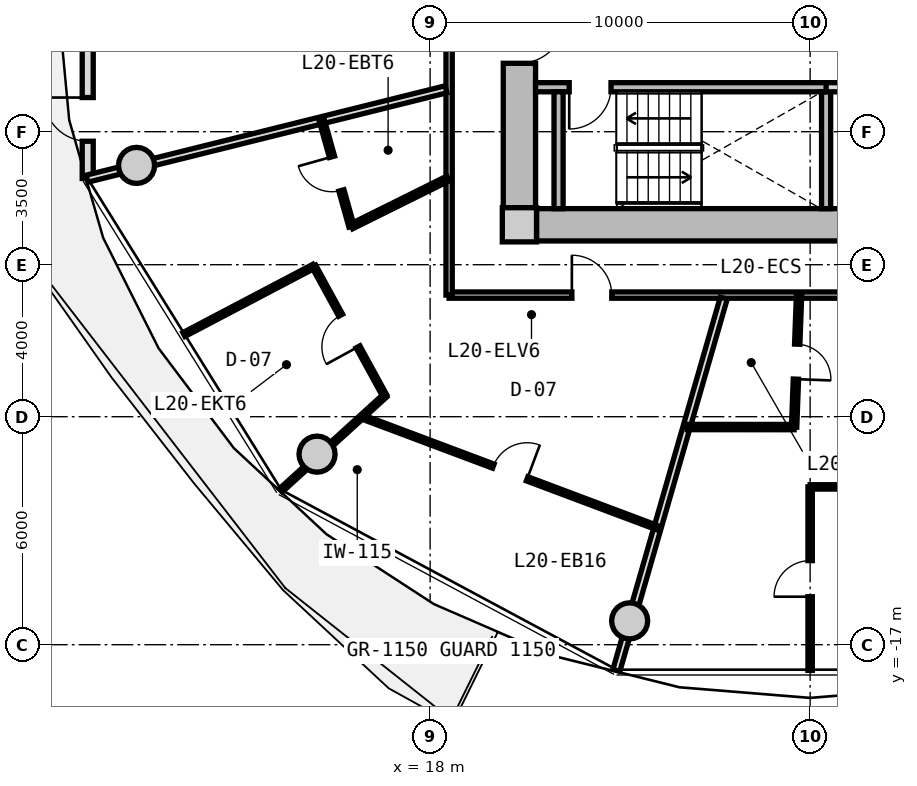
"""IFC4 building model, lengths in metres.
Left out: names, types, materials, properties, quantities, classifications, styles, units other than length and angle.
Written with IfcOpenShell. Run it as: python <this file> out.ifc"""

import sys

from ifc_helpers import new_model, si_unit, direction, frame, frame_2d, origin, origin_2d, place, context, subcontext, project, spatial, rectangle, circle, extrude, source, transform, mapped, element, fill, save


model = new_model("IFC4")
c1 = context("Model", 3, precision=1e-05, world=origin(), true_north=direction((0.0, 1.0)))
c2 = subcontext(c1, "Body", "Model", "MODEL_VIEW")
j1 = project(units=[si_unit("LENGTHUNIT", "METRE"), si_unit("PLANEANGLEUNIT", "RADIAN")], contexts=[c1])
p1 = place(None, origin())
s1 = spatial("IfcSite", under=j1, at=p1, CompositionType="ELEMENT")
p2 = place(p1, origin())
s2 = spatial("IfcBuilding", under=s1, at=p2, CompositionType="ELEMENT")
p3 = place(p2, frame((0.0, 0.0, 67.35)))
s3 = spatial("IfcBuildingStorey", under=s2, at=p3, CompositionType="ELEMENT", Elevation=67.35)
m1 = source(origin(), c2, "Body", "SweptSolid", [
    extrude(rectangle(XDim=0.9, YDim=0.9, at=origin_2d()), origin(), (0.0, 0.0, 1.0), 3.05),
])
p4 = place(p3, frame((20.35, -5.95, 0.0), z_axis=(0.0, 0.0, 1.0), x_axis=(1.0, 0.0, 0.0)))
e1 = element("IfcColumn", 1, at=p4, inside=s3, PredefinedType="COLUMN", context=c2, shape_type="MappedRepresentation", body=[
    mapped(m1, transform((0.0, 0.0, 0.0), x_axis=(1.0, 0.0, 0.0), y_axis=(0.0, 1.0, 0.0), z_axis=(0.0, 0.0, 1.0), scale=1.0)),
])
m2 = source(origin(), c2, "Body", "SweptSolid", [
    extrude(rectangle(XDim=14.4, YDim=0.85, at=frame_2d((7.2, 0.0))), origin(), (0.0, 0.0, 1.0), 2.79),
])
p5 = place(p3, frame((35.2, -5.95, 0.0), z_axis=(0.0, 0.0, 1.0), x_axis=(-1.0, 0.0, 0.0)))
e2 = element("IfcWall", 2, at=p5, inside=s3, PredefinedType="SHEAR", context=c2, shape_type="MappedRepresentation", body=[
    mapped(m2, transform((0.0, 0.0, 0.0), x_axis=(1.0, 0.0, 0.0), y_axis=(0.0, 1.0, 0.0), z_axis=(0.0, 0.0, 1.0), scale=1.0)),
])
m3 = source(origin(), c2, "Body", "SweptSolid", [
    extrude(rectangle(XDim=11.0, YDim=0.85, at=frame_2d((5.5, 0.0))), origin(), (0.0, 0.0, 1.0), 2.79),
])
p6 = place(p3, frame((20.35, -5.5, 0.0), z_axis=(0.0, 0.0, 1.0), x_axis=(0.0, 1.0, 0.0)))
e3 = element("IfcWall", 3, at=p6, inside=s3, PredefinedType="SHEAR", context=c2, shape_type="MappedRepresentation", body=[
    mapped(m3, transform((0.0, 0.0, 0.0), x_axis=(1.0, 0.0, 0.0), y_axis=(0.0, 1.0, 0.0), z_axis=(0.0, 0.0, 1.0), scale=1.0)),
])
p7 = place(p6, frame((3.8, 0.0, 0.0)))
e4 = element("IfcOpeningElement", 4, at=p7, cuts=e3, PredefinedType="OPENING", context=c2, shape_type="SweptSolid", body=[
    extrude(rectangle(XDim=1.2, YDim=2.15, at=frame_2d((0.6, 1.075))), frame((0.0, 0.435, 0.0), z_axis=(0.0, -1.0, 0.0), x_axis=(1.0, 0.0, 0.0)), (0.0, 0.0, 1.0), 0.87),
])
m4 = source(origin(), c2, "Body", "SweptSolid", [
    extrude(circle(Radius=0.475, at=origin_2d()), origin(), (0.0, 0.0, 1.0), 3.05),
])
for number, where, z_axis, x_axis in (
    (5, (10.275, -4.387, 0.0), (0.0, 0.0, 1.0), (1.0, 0.0, 0.0)),
    (6, (15.025, -11.985, 0.0), (0.0, 0.0, 1.0), (1.0, 0.0, 0.0)),
    (7, (23.251, -16.373, 0.0), (0.0, 0.0, 1.0), (1.0, 0.0, 0.0)),
):
    element("IfcColumn", number, at=place(p3, frame(where, z_axis=z_axis, x_axis=x_axis)), inside=s3, PredefinedType="COLUMN", context=c2, shape_type="MappedRepresentation", body=[
        mapped(m4, transform((0.0, 0.0, 0.0), x_axis=(1.0, 0.0, 0.0), y_axis=(0.0, 1.0, 0.0), z_axis=(0.0, 0.0, 1.0), scale=1.0)),
    ])
m5 = source(origin(), c2, "Body", "SweptSolid", [
    extrude(rectangle(XDim=9.462, YDim=0.29, at=frame_2d((4.731, 0.0))), origin(), (0.0, 0.0, 1.0), 2.79),
])
p8 = place(p3, frame((8.99, -4.731, 0.0), z_axis=(0.0, 0.0, 1.0), x_axis=(0.0, 1.0, 0.0)))
e8 = element("IfcWall", 8, at=p8, inside=s3, PredefinedType="SOLIDWALL", context=c2, shape_type="MappedRepresentation", body=[
    mapped(m5, transform((0.0, 0.0, 0.0), x_axis=(1.0, 0.0, 0.0), y_axis=(0.0, 1.0, 0.0), z_axis=(0.0, 0.0, 1.0), scale=1.0)),
])
p9 = place(p8, frame((0.98, 0.0, 0.0)))
e9 = element("IfcOpeningElement", 9, at=p9, cuts=e8, PredefinedType="OPENING", context=c2, shape_type="SweptSolid", body=[
    extrude(rectangle(XDim=1.15, YDim=2.25, at=frame_2d((0.575, 1.125))), frame((0.0, 0.155, 0.0), z_axis=(0.0, -1.0, 0.0), x_axis=(1.0, 0.0, 0.0)), (0.0, 0.0, 1.0), 0.31),
])
p10 = place(p8, frame((5.081, 0.0, 0.85)))
e10 = element("IfcOpeningElement", 10, at=p10, cuts=e8, PredefinedType="OPENING", context=c2, shape_type="SweptSolid", body=[
    extrude(rectangle(XDim=1.2, YDim=1.5, at=frame_2d((0.6, 0.75))), frame((0.0, 0.155, 0.0), z_axis=(0.0, -1.0, 0.0), x_axis=(1.0, 0.0, 0.0)), (0.0, 0.0, 1.0), 0.31),
])
m6 = source(origin(), c2, "Body", "SweptSolid", [
    extrude(rectangle(XDim=7.765, YDim=0.24, at=frame_2d((3.883, 0.0))), origin(), (0.0, 0.0, 1.0), 2.79),
])
p11 = place(p3, frame((20.775, -2.33, 0.0), z_axis=(0.0, 0.0, 1.0), x_axis=(1.0, 0.0, 0.0)))
e11 = element("IfcWall", 11, at=p11, inside=s3, PredefinedType="PARTITIONING", context=c2, shape_type="MappedRepresentation", body=[
    mapped(m6, transform((0.0, 0.0, 0.0), x_axis=(1.0, 0.0, 0.0), y_axis=(0.0, 1.0, 0.0), z_axis=(0.0, 0.0, 1.0), scale=1.0)),
])
p12 = place(p11, frame((0.885, 0.0, 0.0)))
e12 = element("IfcOpeningElement", 12, at=p12, cuts=e11, PredefinedType="OPENING", context=c2, shape_type="SweptSolid", body=[
    extrude(rectangle(XDim=1.1, YDim=2.15, at=frame_2d((0.55, 1.075))), frame((0.0, 0.13, 0.0), z_axis=(0.0, -1.0, 0.0), x_axis=(1.0, 0.0, 0.0)), (0.0, 0.0, 1.0), 0.26),
])
m7 = source(origin(), c2, "Body", "SweptSolid", [
    extrude(rectangle(XDim=3.075, YDim=0.24, at=frame_2d((1.538, 0.0))), origin(), (0.0, 0.0, 1.0), 2.79),
])
for number, where, z_axis, x_axis in (
    (13, (21.38, -5.525, 0.0), (0.0, 0.0, 1.0), (0.0, 1.0, 0.0)),
    (14, (28.42, -5.525, 0.0), (0.0, 0.0, 1.0), (0.0, 1.0, 0.0)),
):
    element("IfcWall", number, at=place(p3, frame(where, z_axis=z_axis, x_axis=x_axis)), inside=s3, PredefinedType="PARTITIONING", context=c2, shape_type="MappedRepresentation", body=[
        mapped(m7, transform((0.0, 0.0, 0.0), x_axis=(1.0, 0.0, 0.0), y_axis=(0.0, 1.0, 0.0), z_axis=(0.0, 0.0, 1.0), scale=1.0)),
    ])
m8 = source(origin(), c2, "Body", "SweptSolid", [
    extrude(rectangle(XDim=4.13, YDim=0.24, at=frame_2d((2.065, 0.0))), origin(), (0.0, 0.0, 1.0), 2.775),
])
p13 = place(p3, frame((28.42, -2.33, 0.0), z_axis=(0.0, 0.0, 1.0), x_axis=(1.0, 0.0, 0.0)))
e15 = element("IfcWall", 15, at=p13, inside=s3, PredefinedType="PARTITIONING", context=c2, shape_type="MappedRepresentation", body=[
    mapped(m8, transform((0.0, 0.0, 0.0), x_axis=(1.0, 0.0, 0.0), y_axis=(0.0, 1.0, 0.0), z_axis=(0.0, 0.0, 1.0), scale=1.0)),
])
m9 = source(origin(), c2, "Body", "SweptSolid", [
    extrude(rectangle(XDim=19.0, YDim=0.165, at=frame_2d((9.5, 0.0))), origin(), (0.0, 0.0, 1.0), 2.775),
])
p14 = place(p3, frame((37.5, -7.8, 0.0), z_axis=(0.0, 0.0, 1.0), x_axis=(-1.0, 0.0, 0.0)))
e16 = element("IfcWall", 16, at=p14, inside=s3, PredefinedType="PARTITIONING", context=c2, shape_type="MappedRepresentation", body=[
    mapped(m9, transform((0.0, 0.0, 0.0), x_axis=(1.0, 0.0, 0.0), y_axis=(0.0, 1.0, 0.0), z_axis=(0.0, 0.0, 1.0), scale=1.0)),
])
p15 = place(p14, frame((14.72, 0.0, 0.0)))
e17 = element("IfcOpeningElement", 17, at=p15, cuts=e16, PredefinedType="OPENING", context=c2, shape_type="SweptSolid", body=[
    extrude(rectangle(XDim=1.05, YDim=2.15, at=frame_2d((0.525, 1.075))), frame((0.0, 0.093, 0.0), z_axis=(0.0, -1.0, 0.0), x_axis=(1.0, 0.0, 0.0)), (0.0, 0.0, 1.0), 0.185),
])
p16 = place(p14, frame((4.847, 0.0, 0.0)))
e18 = element("IfcOpeningElement", 18, at=p16, cuts=e16, PredefinedType="OPENING", context=c2, shape_type="SweptSolid", body=[
    extrude(rectangle(XDim=1.05, YDim=2.15, at=frame_2d((0.525, 1.075))), frame((0.0, 0.093, 0.0), z_axis=(0.0, -1.0, 0.0), x_axis=(1.0, 0.0, 0.0)), (0.0, 0.0, 1.0), 0.185),
])
m10 = source(origin(), c2, "Body", "SweptSolid", [
    extrude(rectangle(XDim=15.6, YDim=0.165, at=frame_2d((7.8, 0.0))), origin(), (0.0, 0.0, 1.0), 2.775),
])
p17 = place(p3, frame((18.5, -7.8, 0.0), z_axis=(0.0, 0.0, 1.0), x_axis=(0.0, 1.0, 0.0)))
e19 = element("IfcWall", 19, at=p17, inside=s3, PredefinedType="PARTITIONING", context=c2, shape_type="MappedRepresentation", body=[
    mapped(m10, transform((0.0, 0.0, 0.0), x_axis=(1.0, 0.0, 0.0), y_axis=(0.0, 1.0, 0.0), z_axis=(0.0, 0.0, 1.0), scale=1.0)),
])
p18 = place(p17, frame((14.215, 0.0, 0.0)))
e20 = element("IfcOpeningElement", 20, at=p18, cuts=e19, PredefinedType="OPENING", context=c2, shape_type="SweptSolid", body=[
    extrude(rectangle(XDim=0.92, YDim=2.1, at=frame_2d((0.46, 1.05))), frame((0.0, 0.093, 0.0), z_axis=(0.0, -1.0, 0.0), x_axis=(1.0, 0.0, 0.0)), (0.0, 0.0, 1.0), 0.185),
])
p19 = place(p17, frame((11.609, 0.0, 0.0)))
e21 = element("IfcOpeningElement", 21, at=p19, cuts=e19, PredefinedType="OPENING", context=c2, shape_type="SweptSolid", body=[
    extrude(rectangle(XDim=0.92, YDim=2.1, at=frame_2d((0.46, 1.05))), frame((0.0, 0.093, 0.0), z_axis=(0.0, -1.0, 0.0), x_axis=(1.0, 0.0, 0.0)), (0.0, 0.0, 1.0), 0.185),
])
p20 = place(p17, frame((7.175, 0.0, 0.0)))
e22 = element("IfcOpeningElement", 22, at=p20, cuts=e19, PredefinedType="OPENING", context=c2, shape_type="SweptSolid", body=[
    extrude(rectangle(XDim=1.25, YDim=2.2, at=frame_2d((0.625, 1.1))), frame((0.0, 0.093, 0.0), z_axis=(0.0, -1.0, 0.0), x_axis=(1.0, 0.0, 0.0)), (0.0, 0.0, 1.0), 0.185),
])
m11 = source(origin(), c2, "Body", "SweptSolid", [
    extrude(rectangle(XDim=9.737, YDim=0.19, at=frame_2d((4.869, 0.0))), origin(), (0.0, 0.0, 1.0), 2.225),
])
p21 = place(p3, frame((18.42, -2.385, 0.0), z_axis=(0.0, 0.0, 1.0), x_axis=(-0.970392716238, -0.241532557375, 0.0)))
e23 = element("IfcWall", 23, at=p21, inside=s3, PredefinedType="PARTITIONING", context=c2, shape_type="MappedRepresentation", body=[
    mapped(m11, transform((0.0, 0.0, 0.0), x_axis=(1.0, 0.0, 0.0), y_axis=(0.0, 1.0, 0.0), z_axis=(0.0, 0.0, 1.0), scale=1.0)),
])
m12 = source(origin(), c2, "Body", "SweptSolid", [
    extrude(rectangle(XDim=10.196, YDim=0.19, at=frame_2d((5.098, 0.0))), origin(), (0.0, 0.0, 1.0), 2.225),
])
p22 = place(p3, frame((25.727, -7.88, 0.0), z_axis=(0.0, 0.0, 1.0), x_axis=(-0.277136420347, -0.960830580549, 0.0)))
e24 = element("IfcWall", 24, at=p22, inside=s3, PredefinedType="PARTITIONING", context=c2, shape_type="MappedRepresentation", body=[
    mapped(m12, transform((0.0, 0.0, 0.0), x_axis=(1.0, 0.0, 0.0), y_axis=(0.0, 1.0, 0.0), z_axis=(0.0, 0.0, 1.0), scale=1.0)),
])
m13 = source(origin(), c2, "Body", "SweptSolid", [
    extrude(rectangle(XDim=8.32, YDim=0.115, at=frame_2d((4.16, 0.0))), origin(), (0.0, 0.0, 1.0), 2.775),
])
p23 = place(p3, frame((16.214, -11.006, 0.0), z_axis=(0.0, 0.0, 1.0), x_axis=(0.936180763098, -0.351518959382, 0.0)))
e25 = element("IfcWall", 25, at=p23, inside=s3, PredefinedType="PARTITIONING", context=c2, shape_type="MappedRepresentation", body=[
    mapped(m13, transform((0.0, 0.0, 0.0), x_axis=(1.0, 0.0, 0.0), y_axis=(0.0, 1.0, 0.0), z_axis=(0.0, 0.0, 1.0), scale=1.0)),
])
p24 = place(p23, frame((3.685, 0.0, 0.0)))
e26 = element("IfcOpeningElement", 26, at=p24, cuts=e25, PredefinedType="OPENING", context=c2, shape_type="SweptSolid", body=[
    extrude(rectangle(XDim=0.95, YDim=2.1, at=frame_2d((0.475, 1.05))), frame((0.0, 0.067, 0.0), z_axis=(0.0, -1.0, 0.0), x_axis=(1.0, 0.0, 0.0)), (0.0, 0.0, 1.0), 0.135),
])
m14 = source(origin(), c2, "Body", "SweptSolid", [
    extrude(rectangle(XDim=3.713, YDim=0.115, at=frame_2d((1.856, 0.0))), origin(), (0.0, 0.0, 1.0), 2.225),
])
p25 = place(p3, frame((16.817, -10.442, 0.0), z_axis=(0.0, 0.0, 1.0), x_axis=(-0.739877587881, -0.67274152165, 0.0)))
e27 = element("IfcWall", 27, at=p25, inside=s3, PredefinedType="PARTITIONING", context=c2, shape_type="MappedRepresentation", body=[
    mapped(m14, transform((0.0, 0.0, 0.0), x_axis=(1.0, 0.0, 0.0), y_axis=(0.0, 1.0, 0.0), z_axis=(0.0, 0.0, 1.0), scale=1.0)),
])
m15 = source(origin(), c2, "Body", "SweptSolid", [
    extrude(rectangle(XDim=2.834, YDim=0.14, at=frame_2d((1.417, 0.0))), origin(), (0.0, 0.0, 1.0), 2.775),
])
p26 = place(p3, frame((18.47, -4.732, 0.0), z_axis=(0.0, 0.0, 1.0), x_axis=(-0.895681174462, -0.444696788513, 0.0)))
e28 = element("IfcWall", 28, at=p26, inside=s3, PredefinedType="PARTITIONING", context=c2, shape_type="MappedRepresentation", body=[
    mapped(m15, transform((0.0, 0.0, 0.0), x_axis=(1.0, 0.0, 0.0), y_axis=(0.0, 1.0, 0.0), z_axis=(0.0, 0.0, 1.0), scale=1.0)),
])
m16 = source(origin(), c2, "Body", "SweptSolid", [
    extrude(rectangle(XDim=2.885, YDim=0.14, at=frame_2d((1.442, 0.0))), origin(), (0.0, 0.0, 1.0), 2.775),
])
p27 = place(p3, frame((15.931, -5.992, 0.0), z_axis=(0.0, 0.0, 1.0), x_axis=(-0.269799431837, 0.962916541856, 0.0)))
e29 = element("IfcWall", 29, at=p27, inside=s3, PredefinedType="PARTITIONING", context=c2, shape_type="MappedRepresentation", body=[
    mapped(m16, transform((0.0, 0.0, 0.0), x_axis=(1.0, 0.0, 0.0), y_axis=(0.0, 1.0, 0.0), z_axis=(0.0, 0.0, 1.0), scale=1.0)),
])
p28 = place(p27, frame((0.982, 0.0, 0.0)))
e30 = element("IfcOpeningElement", 30, at=p28, cuts=e29, PredefinedType="OPENING", context=c2, shape_type="SweptSolid", body=[
    extrude(rectangle(XDim=0.92, YDim=2.1, at=frame_2d((0.46, 1.05))), frame((0.0, 0.08, 0.0), z_axis=(0.0, -1.0, 0.0), x_axis=(1.0, 0.0, 0.0)), (0.0, 0.0, 1.0), 0.16),
])
m17 = source(origin(), c2, "Body", "SweptSolid", [
    extrude(rectangle(XDim=3.864, YDim=0.115, at=frame_2d((1.932, 0.0))), origin(), (0.0, 0.0, 1.0), 2.775),
])
p29 = place(p3, frame((14.94, -7.041, 0.0), z_axis=(0.0, 0.0, 1.0), x_axis=(-0.885194959803, -0.465220252289, 0.0)))
e31 = element("IfcWall", 31, at=p29, inside=s3, PredefinedType="PARTITIONING", context=c2, shape_type="MappedRepresentation", body=[
    mapped(m17, transform((0.0, 0.0, 0.0), x_axis=(1.0, 0.0, 0.0), y_axis=(0.0, 1.0, 0.0), z_axis=(0.0, 0.0, 1.0), scale=1.0)),
])
m18 = source(origin(), c2, "Body", "SweptSolid", [
    extrude(rectangle(XDim=3.888, YDim=0.115, at=frame_2d((1.944, 0.0))), origin(), (0.0, 0.0, 1.0), 2.775),
])
p30 = place(p3, frame((14.94, -7.041, 0.0), z_axis=(0.0, 0.0, 1.0), x_axis=(0.480382482853, -0.877059103007, 0.0)))
e32 = element("IfcWall", 32, at=p30, inside=s3, PredefinedType="PARTITIONING", context=c2, shape_type="MappedRepresentation", body=[
    mapped(m18, transform((0.0, 0.0, 0.0), x_axis=(1.0, 0.0, 0.0), y_axis=(0.0, 1.0, 0.0), z_axis=(0.0, 0.0, 1.0), scale=1.0)),
])
p31 = place(p30, frame((1.469, 0.0, 0.0)))
e33 = element("IfcOpeningElement", 33, at=p31, cuts=e32, PredefinedType="OPENING", context=c2, shape_type="SweptSolid", body=[
    extrude(rectangle(XDim=0.95, YDim=2.1, at=frame_2d((0.475, 1.05))), frame((0.0, 0.067, 0.0), z_axis=(0.0, -1.0, 0.0), x_axis=(1.0, 0.0, 0.0)), (0.0, 0.0, 1.0), 0.135),
])
m19 = source(origin(), c2, "Body", "SweptSolid", [
    extrude(rectangle(XDim=3.446, YDim=0.14, at=frame_2d((1.723, 0.0))), origin(), (0.0, 0.0, 1.0), 2.775),
])
p32 = place(p3, frame((27.707, -7.83, 0.0), z_axis=(0.0, 0.0, 1.0), x_axis=(-0.037409983043, -0.999300001585, 0.0)))
e34 = element("IfcWall", 34, at=p32, inside=s3, PredefinedType="PARTITIONING", context=c2, shape_type="MappedRepresentation", body=[
    mapped(m19, transform((0.0, 0.0, 0.0), x_axis=(1.0, 0.0, 0.0), y_axis=(0.0, 1.0, 0.0), z_axis=(0.0, 0.0, 1.0), scale=1.0)),
])
p33 = place(p32, frame((1.263, 0.0, 0.0)))
e35 = element("IfcOpeningElement", 35, at=p33, cuts=e34, PredefinedType="OPENING", context=c2, shape_type="SweptSolid", body=[
    extrude(rectangle(XDim=0.92, YDim=2.1, at=frame_2d((0.46, 1.05))), frame((0.0, 0.08, 0.0), z_axis=(0.0, -1.0, 0.0), x_axis=(1.0, 0.0, 0.0)), (0.0, 0.0, 1.0), 0.16),
])
m20 = source(origin(), c2, "Body", "SweptSolid", [
    extrude(rectangle(XDim=2.813, YDim=0.14, at=frame_2d((1.406, 0.0))), origin(), (0.0, 0.0, 1.0), 2.775),
])
p34 = place(p3, frame((27.578, -11.273, 0.0), z_axis=(0.0, 0.0, 1.0), x_axis=(-0.99999981542, 0.000607586035, 0.0)))
e36 = element("IfcWall", 36, at=p34, inside=s3, PredefinedType="PARTITIONING", context=c2, shape_type="MappedRepresentation", body=[
    mapped(m20, transform((0.0, 0.0, 0.0), x_axis=(1.0, 0.0, 0.0), y_axis=(0.0, 1.0, 0.0), z_axis=(0.0, 0.0, 1.0), scale=1.0)),
])
m21 = source(origin(), c2, "Body", "SweptSolid", [
    extrude(rectangle(XDim=4.829, YDim=0.115, at=frame_2d((2.415, 0.0))), origin(), (0.0, 0.0, 1.0), 2.775),
])
p35 = place(p3, frame((28.0, -12.848, 0.0), z_axis=(0.0, 0.0, 1.0), x_axis=(0.0, -1.0, 0.0)))
e37 = element("IfcWall", 37, at=p35, inside=s3, PredefinedType="PARTITIONING", context=c2, shape_type="MappedRepresentation", body=[
    mapped(m21, transform((0.0, 0.0, 0.0), x_axis=(1.0, 0.0, 0.0), y_axis=(0.0, 1.0, 0.0), z_axis=(0.0, 0.0, 1.0), scale=1.0)),
])
p36 = place(p35, frame((1.939, 0.0, 0.0)))
e38 = element("IfcOpeningElement", 38, at=p36, cuts=e37, PredefinedType="OPENING", context=c2, shape_type="SweptSolid", body=[
    extrude(rectangle(XDim=0.95, YDim=2.1, at=frame_2d((0.475, 1.05))), frame((0.0, 0.067, 0.0), z_axis=(0.0, -1.0, 0.0), x_axis=(1.0, 0.0, 0.0)), (0.0, 0.0, 1.0), 0.135),
])
m22 = source(origin(), c2, "Body", "SweptSolid", [
    extrude(rectangle(XDim=3.686, YDim=0.115, at=frame_2d((1.843, 0.0))), origin(), (0.0, 0.0, 1.0), 2.775),
])
p37 = place(p3, frame((28.0, -12.848, 0.0), z_axis=(0.0, 0.0, 1.0), x_axis=(0.999999780653, 0.000662339237, 0.0)))
e39 = element("IfcWall", 39, at=p37, inside=s3, PredefinedType="PARTITIONING", context=c2, shape_type="MappedRepresentation", body=[
    mapped(m22, transform((0.0, 0.0, 0.0), x_axis=(1.0, 0.0, 0.0), y_axis=(0.0, 1.0, 0.0), z_axis=(0.0, 0.0, 1.0), scale=1.0)),
])
m23 = source(origin(), c2, "Body", "SweptSolid", [
    extrude(rectangle(XDim=1.15, YDim=2.25, at=frame_2d((0.575, 1.125))), frame((0.0, 0.025, 0.0), z_axis=(0.0, -1.0, 0.0), x_axis=(1.0, 0.0, 0.0)), (0.0, 0.0, 1.0), 0.05),
])
p38 = place(p9, origin())
e40 = element("IfcDoor", 40, at=p38, inside=s3, OperationType="SINGLE_SWING_RIGHT", PredefinedType="DOOR", context=c2, shape_type="MappedRepresentation", body=[
    mapped(m23, transform((0.0, 0.0, 0.0), x_axis=(1.0, 0.0, 0.0), y_axis=(0.0, 1.0, 0.0), z_axis=(0.0, 0.0, 1.0), scale=1.0)),
])
fill(e9, e40)
m24 = source(origin(), c2, "Body", "SweptSolid", [
    extrude(rectangle(XDim=1.1, YDim=2.15, at=frame_2d((0.55, 1.075))), frame((0.0, 0.025, 0.0), z_axis=(0.0, -1.0, 0.0), x_axis=(1.0, 0.0, 0.0)), (0.0, 0.0, 1.0), 0.05),
])
p39 = place(p12, frame((1.1, 0.0, 0.0), z_axis=(0.0, 0.0, 1.0), x_axis=(-1.0, 0.0, 0.0)))
e41 = element("IfcDoor", 41, at=p39, inside=s3, OperationType="SINGLE_SWING_RIGHT", PredefinedType="DOOR", context=c2, shape_type="MappedRepresentation", body=[
    mapped(m24, transform((0.0, 0.0, 0.0), x_axis=(1.0, 0.0, 0.0), y_axis=(0.0, 1.0, 0.0), z_axis=(0.0, 0.0, 1.0), scale=1.0)),
])
fill(e12, e41)
m25 = source(origin(), c2, "Body", "SweptSolid", [
    extrude(rectangle(XDim=1.2, YDim=2.15, at=frame_2d((0.6, 1.075))), frame((0.0, 0.025, 0.0), z_axis=(0.0, -1.0, 0.0), x_axis=(1.0, 0.0, 0.0)), (0.0, 0.0, 1.0), 0.05),
])
p40 = place(p7, frame((1.2, 0.0, 0.0), z_axis=(0.0, 0.0, 1.0), x_axis=(-1.0, 0.0, 0.0)))
e42 = element("IfcDoor", 42, at=p40, inside=s3, OperationType="SINGLE_SWING_LEFT", PredefinedType="DOOR", context=c2, shape_type="MappedRepresentation", body=[
    mapped(m25, transform((0.0, 0.0, 0.0), x_axis=(1.0, 0.0, 0.0), y_axis=(0.0, 1.0, 0.0), z_axis=(0.0, 0.0, 1.0), scale=1.0)),
])
fill(e4, e42)
m26 = source(origin(), c2, "Body", "SweptSolid", [
    extrude(rectangle(XDim=1.05, YDim=2.15, at=frame_2d((0.525, 1.075))), frame((0.0, 0.025, 0.0), z_axis=(0.0, -1.0, 0.0), x_axis=(1.0, 0.0, 0.0)), (0.0, 0.0, 1.0), 0.05),
])
p41 = place(p15, frame((1.05, 0.0, 0.0), z_axis=(0.0, 0.0, 1.0), x_axis=(-1.0, 0.0, 0.0)))
e43 = element("IfcDoor", 43, at=p41, inside=s3, OperationType="SINGLE_SWING_LEFT", PredefinedType="DOOR", context=c2, shape_type="MappedRepresentation", body=[
    mapped(m26, transform((0.0, 0.0, 0.0), x_axis=(1.0, 0.0, 0.0), y_axis=(0.0, 1.0, 0.0), z_axis=(0.0, 0.0, 1.0), scale=1.0)),
])
fill(e17, e43)
m27 = source(origin(), c2, "Body", "SweptSolid", [
    extrude(rectangle(XDim=0.92, YDim=2.1, at=frame_2d((0.46, 1.05))), frame((0.0, 0.025, 0.0), z_axis=(0.0, -1.0, 0.0), x_axis=(1.0, 0.0, 0.0)), (0.0, 0.0, 1.0), 0.05),
])
p42 = place(p28, origin())
e44 = element("IfcDoor", 44, at=p42, inside=s3, OperationType="SINGLE_SWING_RIGHT", PredefinedType="DOOR", context=c2, shape_type="MappedRepresentation", body=[
    mapped(m27, transform((0.0, 0.0, 0.0), x_axis=(1.0, 0.0, 0.0), y_axis=(0.0, 1.0, 0.0), z_axis=(0.0, 0.0, 1.0), scale=1.0)),
])
fill(e30, e44)
m28 = source(origin(), c2, "Body", "SweptSolid", [
    extrude(rectangle(XDim=0.95, YDim=2.1, at=frame_2d((0.475, 1.05))), frame((0.0, 0.025, 0.0), z_axis=(0.0, -1.0, 0.0), x_axis=(1.0, 0.0, 0.0)), (0.0, 0.0, 1.0), 0.05),
])
p43 = place(p31, frame((0.95, 0.0, 0.0), z_axis=(0.0, 0.0, 1.0), x_axis=(-1.0, 0.0, 0.0)))
e45 = element("IfcDoor", 45, at=p43, inside=s3, OperationType="SINGLE_SWING_LEFT", PredefinedType="DOOR", context=c2, shape_type="MappedRepresentation", body=[
    mapped(m28, transform((0.0, 0.0, 0.0), x_axis=(1.0, 0.0, 0.0), y_axis=(0.0, 1.0, 0.0), z_axis=(0.0, 0.0, 1.0), scale=1.0)),
])
fill(e33, e45)
p44 = place(p24, origin())
e46 = element("IfcDoor", 46, at=p44, inside=s3, OperationType="SINGLE_SWING_RIGHT", PredefinedType="DOOR", context=c2, shape_type="MappedRepresentation", body=[
    mapped(m28, transform((0.0, 0.0, 0.0), x_axis=(1.0, 0.0, 0.0), y_axis=(0.0, 1.0, 0.0), z_axis=(0.0, 0.0, 1.0), scale=1.0)),
])
fill(e26, e46)
p45 = place(p33, origin())
e47 = element("IfcDoor", 47, at=p45, inside=s3, OperationType="SINGLE_SWING_RIGHT", PredefinedType="DOOR", context=c2, shape_type="MappedRepresentation", body=[
    mapped(m27, transform((0.0, 0.0, 0.0), x_axis=(1.0, 0.0, 0.0), y_axis=(0.0, 1.0, 0.0), z_axis=(0.0, 0.0, 1.0), scale=1.0)),
])
fill(e35, e47)
p46 = place(p36, frame((0.95, 0.0, 0.0), z_axis=(0.0, 0.0, 1.0), x_axis=(-1.0, 0.0, 0.0)))
e48 = element("IfcDoor", 48, at=p46, inside=s3, OperationType="SINGLE_SWING_LEFT", PredefinedType="DOOR", context=c2, shape_type="MappedRepresentation", body=[
    mapped(m28, transform((0.0, 0.0, 0.0), x_axis=(1.0, 0.0, 0.0), y_axis=(0.0, 1.0, 0.0), z_axis=(0.0, 0.0, 1.0), scale=1.0)),
])
fill(e38, e48)
save(model, sys.argv[1])
